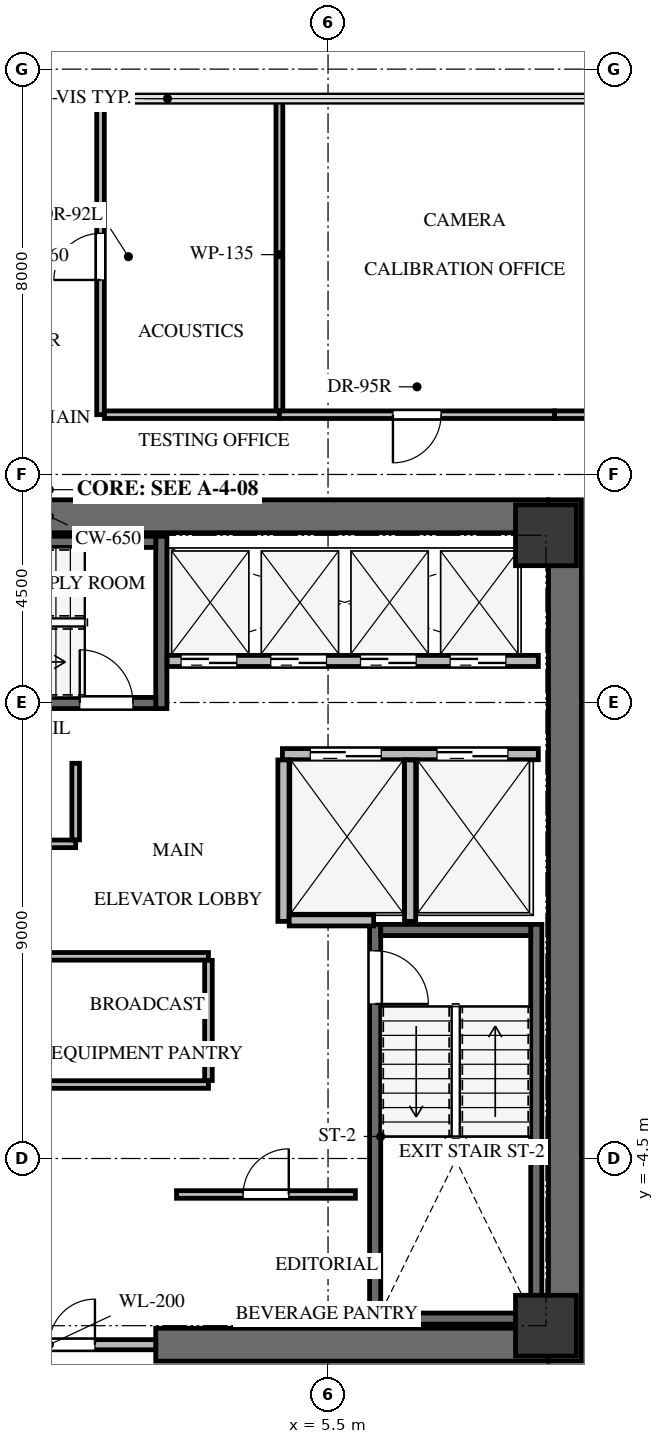
"""IFC4 building model, lengths in metres.
Left out: names, types, materials, properties, quantities, classifications, styles, units other than length and angle.
Written with IfcOpenShell. Run it as: python <this file> out.ifc"""

import sys

from ifc_helpers import new_model, si_unit, direction, frame, frame_2d, origin, origin_2d, place, context, subcontext, project, spatial, rectangle, extrude, source, transform, mapped, element, fill, save


model = new_model("IFC4")
c1 = context("Model", 3, precision=1e-05, world=origin(), true_north=direction((0.0, 1.0)))
c2 = subcontext(c1, "Body", "Model", "MODEL_VIEW")
j1 = project(units=[si_unit("LENGTHUNIT", "METRE"), si_unit("PLANEANGLEUNIT", "RADIAN")], contexts=[c1])
p1 = place(None, origin())
s1 = spatial("IfcSite", under=j1, at=p1, CompositionType="ELEMENT")
p2 = place(p1, origin())
s2 = spatial("IfcBuilding", under=s1, at=p2, CompositionType="ELEMENT")
p3 = place(p2, frame((0.0, 0.0, 159.3)))
s3 = spatial("IfcBuildingStorey", under=s2, at=p3, CompositionType="ELEMENT", Elevation=159.3)
p4 = place(p3, frame((10.175, -8.5, 0.0), z_axis=(0.0, 0.0, 1.0), x_axis=(0.0, 1.0, 0.0)))
e1 = element("IfcWall", 1, at=p4, inside=s3, PredefinedType="SHEAR", context=c2, shape_type="SweptSolid", body=[
    extrude(rectangle(XDim=17.0, YDim=0.65, at=frame_2d((8.5, 0.0))), origin(), (0.0, 0.0, 1.0), 3.3),
])
p5 = place(p3, frame((2.1, -8.175, 0.0), z_axis=(0.0, 0.0, 1.0), x_axis=(1.0, 0.0, 0.0)))
e2 = element("IfcWall", 2, at=p5, inside=s3, PredefinedType="SHEAR", context=c2, shape_type="SweptSolid", body=[
    extrude(rectangle(XDim=7.75, YDim=0.65, at=frame_2d((3.875, 0.0))), origin(), (0.0, 0.0, 1.0), 3.3),
])
p6 = place(p3, frame((-9.85, 8.175, 0.0), z_axis=(0.0, 0.0, 1.0), x_axis=(1.0, 0.0, 0.0)))
e3 = element("IfcWall", 3, at=p6, inside=s3, PredefinedType="SHEAR", context=c2, shape_type="SweptSolid", body=[
    extrude(rectangle(XDim=19.7, YDim=0.65, at=frame_2d((9.85, 0.0))), origin(), (0.0, 0.0, 1.0), 3.3),
])
p7 = place(p3, frame((9.61, -7.77, -0.24), z_axis=(0.0, 0.0, 1.0), x_axis=(0.0, 1.0, 0.0)))
e4 = element("IfcWall", 4, at=p7, inside=s3, PredefinedType="SHEAR", context=c2, shape_type="SweptSolid", body=[
    extrude(rectangle(XDim=7.89, YDim=0.22, at=frame_2d((3.945, 0.0))), origin(), (0.0, 0.0, 1.0), 3.22),
])
p8 = place(p3, frame((6.43, 0.12, -0.24), z_axis=(0.0, 0.0, 1.0), x_axis=(0.0, -1.0, 0.0)))
e5 = element("IfcWall", 5, at=p8, inside=s3, PredefinedType="SHEAR", context=c2, shape_type="SweptSolid", body=[
    extrude(rectangle(XDim=7.89, YDim=0.22, at=frame_2d((3.945, 0.0))), origin(), (0.0, 0.0, 1.0), 3.22),
])
p9 = place(p8, frame((0.52, 0.0, 0.0)))
e6 = element("IfcOpeningElement", 6, at=p9, cuts=e5, PredefinedType="OPENING", context=c2, shape_type="SweptSolid", body=[
    extrude(rectangle(XDim=1.05, YDim=2.15, at=frame_2d((0.525, 1.075))), frame((0.0, 0.12, 0.0), z_axis=(0.0, -1.0, 0.0), x_axis=(1.0, 0.0, 0.0)), (0.0, 0.0, 1.0), 0.24),
])
for number, where, z_axis, x_axis in (
    (7, (6.54, -7.66, -0.24), (0.0, 0.0, 1.0), (1.0, 0.0, 0.0)),
    (8, (9.5, 0.01, -0.24), (0.0, 0.0, 1.0), (-1.0, 0.0, 0.0)),
):
    element("IfcWall", number, at=place(p3, frame(where, z_axis=z_axis, x_axis=x_axis)), inside=s3, PredefinedType="SHEAR", context=c2, shape_type="SweptSolid", body=[
        extrude(rectangle(XDim=2.96, YDim=0.22, at=frame_2d((1.48, 0.0))), origin(), (0.0, 0.0, 1.0), 3.22),
    ])
p10 = place(p3, frame((2.21, 4.38, -0.24), z_axis=(0.0, 0.0, 1.0), x_axis=(0.0, 1.0, 0.0)))
e9 = element("IfcWall", 9, at=p10, inside=s3, PredefinedType="SHEAR", context=c2, shape_type="SweptSolid", body=[
    extrude(rectangle(XDim=3.4, YDim=0.22, at=frame_2d((1.7, 0.0))), origin(), (0.0, 0.0, 1.0), 3.22),
])
p11 = place(p3, frame((-5.25, 4.49, -0.24), z_axis=(0.0, 0.0, 1.0), x_axis=(1.0, 0.0, 0.0)))
e10 = element("IfcWall", 10, at=p11, inside=s3, PredefinedType="SHEAR", context=c2, shape_type="SweptSolid", body=[
    extrude(rectangle(XDim=7.35, YDim=0.22, at=frame_2d((3.675, 0.0))), origin(), (0.0, 0.0, 1.0), 3.22),
])
p12 = place(p11, frame((5.85, 0.0, 0.0)))
e11 = element("IfcOpeningElement", 11, at=p12, cuts=e10, PredefinedType="OPENING", context=c2, shape_type="SweptSolid", body=[
    extrude(rectangle(XDim=1.05, YDim=2.15, at=frame_2d((0.525, 1.075))), frame((0.0, 0.12, 0.0), z_axis=(0.0, -1.0, 0.0), x_axis=(1.0, 0.0, 0.0)), (0.0, 0.0, 1.0), 0.24),
])
p13 = place(p3, frame((2.1, 7.67, -0.24), z_axis=(0.0, 0.0, 1.0), x_axis=(-1.0, 0.0, 0.0)))
e12 = element("IfcWall", 12, at=p13, inside=s3, PredefinedType="SHEAR", context=c2, shape_type="SweptSolid", body=[
    extrude(rectangle(XDim=7.35, YDim=0.22, at=frame_2d((3.675, 0.0))), origin(), (0.0, 0.0, 1.0), 3.22),
])
m1 = source(origin(), c2, "Body", "SweptSolid", [
    extrude(rectangle(XDim=1.2, YDim=1.2, at=origin_2d()), origin(), (0.0, 0.0, 1.0), 3.22),
])
for number, where, z_axis, x_axis in (
    (13, (9.8, -7.8, -0.24), (0.0, 0.0, 1.0), (1.0, 0.0, 0.0)),
    (14, (9.8, 7.8, -0.24), (0.0, 0.0, 1.0), (1.0, 0.0, 0.0)),
):
    element("IfcColumn", number, at=place(p3, frame(where, z_axis=z_axis, x_axis=x_axis)), inside=s3, PredefinedType="COLUMN", context=c2, shape_type="MappedRepresentation", body=[
        mapped(m1, transform((0.0, 0.0, 0.0), x_axis=(1.0, 0.0, 0.0), y_axis=(0.0, 1.0, 0.0), z_axis=(0.0, 0.0, 1.0), scale=1.0)),
    ])
p14 = place(p3, frame((-2.1, -8.175, 0.0), z_axis=(0.0, 0.0, 1.0), x_axis=(1.0, 0.0, 0.0)))
e15 = element("IfcWall", 15, at=p14, inside=s3, PredefinedType="SOLIDWALL", context=c2, shape_type="SweptSolid", body=[
    extrude(rectangle(XDim=4.2, YDim=0.2, at=frame_2d((2.1, 0.0))), origin(), (0.0, 0.0, 1.0), 2.965),
])
p15 = place(p14, frame((1.2, 0.0, 0.0)))
e16 = element("IfcOpeningElement", 16, at=p15, cuts=e15, PredefinedType="OPENING", context=c2, shape_type="SweptSolid", body=[
    extrude(rectangle(XDim=1.8, YDim=2.15, at=frame_2d((0.9, 1.075))), frame((0.0, 0.11, 0.0), z_axis=(0.0, -1.0, 0.0), x_axis=(1.0, 0.0, 0.0)), (0.0, 0.0, 1.0), 0.22),
])
p16 = place(p3, frame((4.6, 3.48, 0.0), z_axis=(0.0, 0.0, 1.0), x_axis=(1.0, 0.0, 0.0)))
e17 = element("IfcWall", 17, at=p16, inside=s3, PredefinedType="SOLIDWALL", context=c2, shape_type="SweptSolid", body=[
    extrude(rectangle(XDim=5.05, YDim=0.22, at=frame_2d((2.525, 0.0))), origin(), (0.0, 0.0, 1.0), 2.965),
])
p17 = place(p16, frame((0.55, 0.0, 0.0)))
e18 = element("IfcOpeningElement", 18, at=p17, cuts=e17, PredefinedType="OPENING", context=c2, shape_type="SweptSolid", body=[
    extrude(rectangle(XDim=1.4, YDim=2.15, at=frame_2d((0.7, 1.075))), frame((0.0, 0.12, 0.0), z_axis=(0.0, -1.0, 0.0), x_axis=(1.0, 0.0, 0.0)), (0.0, 0.0, 1.0), 0.24),
])
p18 = place(p16, frame((3.05, 0.0, 0.0)))
e19 = element("IfcOpeningElement", 19, at=p18, cuts=e17, PredefinedType="OPENING", context=c2, shape_type="SweptSolid", body=[
    extrude(rectangle(XDim=1.4, YDim=2.15, at=frame_2d((0.7, 1.075))), frame((0.0, 0.12, 0.0), z_axis=(0.0, -1.0, 0.0), x_axis=(1.0, 0.0, 0.0)), (0.0, 0.0, 1.0), 0.24),
])
for number, where, z_axis, x_axis in (
    (20, (4.62, 0.18, 0.0), (0.0, 0.0, 1.0), (0.0, 1.0, 0.0)),
    (21, (7.12, 0.18, 0.0), (0.0, 0.0, 1.0), (0.0, 1.0, 0.0)),
):
    element("IfcWall", number, at=place(p3, frame(where, z_axis=z_axis, x_axis=x_axis)), inside=s3, PredefinedType="SOLIDWALL", context=c2, shape_type="SweptSolid", body=[
        extrude(rectangle(XDim=3.186, YDim=0.22, at=frame_2d((1.593, 0.0))), origin(), (0.0, 0.0, 1.0), 2.965),
    ])
p19 = place(p3, frame((4.734, 0.2, 0.0), z_axis=(0.0, 0.0, 1.0), x_axis=(1.0, 0.0, 0.0)))
e22 = element("IfcWall", 22, at=p19, inside=s3, PredefinedType="SOLIDWALL", context=c2, shape_type="SweptSolid", body=[
    extrude(rectangle(XDim=1.666, YDim=0.22, at=frame_2d((0.833, 0.0))), origin(), (0.0, 0.0, 1.0), 2.965),
])
p20 = place(p3, frame((2.325, 5.32, 0.0), z_axis=(0.0, 0.0, 1.0), x_axis=(1.0, 0.0, 0.0)))
e23 = element("IfcWall", 23, at=p20, inside=s3, PredefinedType="SOLIDWALL", context=c2, shape_type="SweptSolid", body=[
    extrude(rectangle(XDim=7.325, YDim=0.22, at=frame_2d((3.663, 0.0))), origin(), (0.0, 0.0, 1.0), 2.965),
])
p21 = place(p20, frame((0.275, 0.0, 0.0)))
e24 = element("IfcOpeningElement", 24, at=p21, cuts=e23, PredefinedType="OPENING", context=c2, shape_type="SweptSolid", body=[
    extrude(rectangle(XDim=1.1, YDim=2.15, at=frame_2d((0.55, 1.075))), frame((0.0, 0.12, 0.0), z_axis=(0.0, -1.0, 0.0), x_axis=(1.0, 0.0, 0.0)), (0.0, 0.0, 1.0), 0.24),
])
p22 = place(p20, frame((2.045, 0.0, 0.0)))
e25 = element("IfcOpeningElement", 25, at=p22, cuts=e23, PredefinedType="OPENING", context=c2, shape_type="SweptSolid", body=[
    extrude(rectangle(XDim=1.1, YDim=2.15, at=frame_2d((0.55, 1.075))), frame((0.0, 0.12, 0.0), z_axis=(0.0, -1.0, 0.0), x_axis=(1.0, 0.0, 0.0)), (0.0, 0.0, 1.0), 0.24),
])
p23 = place(p20, frame((3.815, 0.0, 0.0)))
e26 = element("IfcOpeningElement", 26, at=p23, cuts=e23, PredefinedType="OPENING", context=c2, shape_type="SweptSolid", body=[
    extrude(rectangle(XDim=1.1, YDim=2.15, at=frame_2d((0.55, 1.075))), frame((0.0, 0.12, 0.0), z_axis=(0.0, -1.0, 0.0), x_axis=(1.0, 0.0, 0.0)), (0.0, 0.0, 1.0), 0.24),
])
p24 = place(p20, frame((5.585, 0.0, 0.0)))
e27 = element("IfcOpeningElement", 27, at=p24, cuts=e23, PredefinedType="OPENING", context=c2, shape_type="SweptSolid", body=[
    extrude(rectangle(XDim=1.1, YDim=2.15, at=frame_2d((0.55, 1.075))), frame((0.0, 0.12, 0.0), z_axis=(0.0, -1.0, 0.0), x_axis=(1.0, 0.0, 0.0)), (0.0, 0.0, 1.0), 0.24),
])
p25 = place(p3, frame((2.51, -5.21, 0.0), z_axis=(0.0, 0.0, 1.0), x_axis=(1.0, 0.0, 0.0)))
e28 = element("IfcWall", 28, at=p25, inside=s3, PredefinedType="PARTITIONING", context=c2, shape_type="SweptSolid", body=[
    extrude(rectangle(XDim=3.53, YDim=0.15, at=frame_2d((1.765, 0.0))), origin(), (0.0, 0.0, 1.0), 2.965),
])
p26 = place(p25, frame((1.315, 0.0, 0.0)))
e29 = element("IfcOpeningElement", 29, at=p26, cuts=e28, PredefinedType="OPENING", context=c2, shape_type="SweptSolid", body=[
    extrude(rectangle(XDim=0.9, YDim=2.05, at=frame_2d((0.45, 1.025))), frame((0.0, 0.085, 0.0), z_axis=(0.0, -1.0, 0.0), x_axis=(1.0, 0.0, 0.0)), (0.0, 0.0, 1.0), 0.17),
])
p27 = place(p3, frame((3.14, -3.04, 0.0), z_axis=(0.0, 0.0, 1.0), x_axis=(-1.0, 0.0, 0.0)))
e30 = element("IfcWall", 30, at=p27, inside=s3, PredefinedType="PARTITIONING", context=c2, shape_type="SweptSolid", body=[
    extrude(rectangle(XDim=7.48, YDim=0.15, at=frame_2d((3.74, 0.0))), origin(), (0.0, 0.0, 1.0), 2.965),
])
p28 = place(p27, frame((3.29, 0.0, 0.0)))
e31 = element("IfcOpeningElement", 31, at=p28, cuts=e30, PredefinedType="OPENING", context=c2, shape_type="SweptSolid", body=[
    extrude(rectangle(XDim=0.9, YDim=2.05, at=frame_2d((0.45, 1.025))), frame((0.0, 0.085, 0.0), z_axis=(0.0, -1.0, 0.0), x_axis=(1.0, 0.0, 0.0)), (0.0, 0.0, 1.0), 0.17),
])
p29 = place(p3, frame((-4.34, -0.51, 0.0), z_axis=(0.0, 0.0, 1.0), x_axis=(1.0, 0.0, 0.0)))
e32 = element("IfcWall", 32, at=p29, inside=s3, PredefinedType="PARTITIONING", context=c2, shape_type="SweptSolid", body=[
    extrude(rectangle(XDim=7.48, YDim=0.15, at=frame_2d((3.74, 0.0))), origin(), (0.0, 0.0, 1.0), 2.965),
])
p30 = place(p3, frame((3.14, -0.589, 0.0), z_axis=(0.0, 0.0, 1.0), x_axis=(0.0, -1.0, 0.0)))
e33 = element("IfcWall", 33, at=p30, inside=s3, PredefinedType="PARTITIONING", context=c2, shape_type="SweptSolid", body=[
    extrude(rectangle(XDim=2.372, YDim=0.15, at=frame_2d((1.186, 0.0))), origin(), (0.0, 0.0, 1.0), 2.965),
])
p31 = place(p3, frame((0.52, 1.71, 0.0), z_axis=(0.0, 0.0, 1.0), x_axis=(-1.0, 0.0, 0.0)))
e34 = element("IfcWall", 34, at=p31, inside=s3, PredefinedType="PARTITIONING", context=c2, shape_type="SweptSolid", body=[
    extrude(rectangle(XDim=2.94, YDim=0.15, at=frame_2d((1.47, 0.0))), origin(), (0.0, 0.0, 1.0), 2.965),
])
p32 = place(p31, frame((1.02, 0.0, 0.0)))
e35 = element("IfcOpeningElement", 35, at=p32, cuts=e34, PredefinedType="OPENING", context=c2, shape_type="SweptSolid", body=[
    extrude(rectangle(XDim=0.9, YDim=2.05, at=frame_2d((0.45, 1.025))), frame((0.0, 0.085, 0.0), z_axis=(0.0, -1.0, 0.0), x_axis=(1.0, 0.0, 0.0)), (0.0, 0.0, 1.0), 0.17),
])
p33 = place(p3, frame((0.52, 3.3, 0.0), z_axis=(0.0, 0.0, 1.0), x_axis=(0.0, -1.0, 0.0)))
e36 = element("IfcWall", 36, at=p33, inside=s3, PredefinedType="PARTITIONING", context=c2, shape_type="SweptSolid", body=[
    extrude(rectangle(XDim=1.511, YDim=0.15, at=frame_2d((0.755, 0.0))), origin(), (0.0, 0.0, 1.0), 2.965),
])
p34 = place(p3, frame((1.01, 10.18, 0.0), z_axis=(0.0, 0.0, 1.0), x_axis=(0.0, 1.0, 0.0)))
e37 = element("IfcWall", 37, at=p34, inside=s3, PredefinedType="PARTITIONING", context=c2, shape_type="SweptSolid", body=[
    extrude(rectangle(XDim=6.238, YDim=0.15, at=frame_2d((3.119, 0.0))), origin(), (0.0, 0.0, 1.0), 2.319),
])
p35 = place(p34, frame((2.659, 0.0, 0.0)))
e38 = element("IfcOpeningElement", 38, at=p35, cuts=e37, PredefinedType="OPENING", context=c2, shape_type="SweptSolid", body=[
    extrude(rectangle(XDim=0.92, YDim=2.1, at=frame_2d((0.46, 1.05))), frame((0.0, 0.085, 0.0), z_axis=(0.0, -1.0, 0.0), x_axis=(1.0, 0.0, 0.0)), (0.0, 0.0, 1.0), 0.17),
])
p36 = place(p3, frame((4.54, 10.18, 0.0), z_axis=(0.0, 0.0, 1.0), x_axis=(-1.0, 0.0, 0.0)))
e39 = element("IfcWall", 39, at=p36, inside=s3, PredefinedType="PARTITIONING", context=c2, shape_type="SweptSolid", body=[
    extrude(rectangle(XDim=3.451, YDim=0.15, at=frame_2d((1.726, 0.0))), origin(), (0.0, 0.0, 1.0), 2.528),
])
p37 = place(p3, frame((9.971, 10.18, 0.0), z_axis=(0.0, 0.0, 1.0), x_axis=(-1.0, 0.0, 0.0)))
e40 = element("IfcWall", 40, at=p37, inside=s3, PredefinedType="PARTITIONING", context=c2, shape_type="SweptSolid", body=[
    extrude(rectangle(XDim=5.431, YDim=0.15, at=frame_2d((2.716, 0.0))), origin(), (0.0, 0.0, 1.0), 2.528),
])
p38 = place(p37, frame((2.241, 0.0, 0.0)))
e41 = element("IfcOpeningElement", 41, at=p38, cuts=e40, PredefinedType="OPENING", context=c2, shape_type="SweptSolid", body=[
    extrude(rectangle(XDim=0.95, YDim=2.1, at=frame_2d((0.475, 1.05))), frame((0.0, 0.085, 0.0), z_axis=(0.0, -1.0, 0.0), x_axis=(1.0, 0.0, 0.0)), (0.0, 0.0, 1.0), 0.17),
])
p39 = place(p3, frame((11.146, 10.18, 0.0), z_axis=(0.0, 0.0, 1.0), x_axis=(-1.0, 0.0, 0.0)))
e42 = element("IfcWall", 42, at=p39, inside=s3, PredefinedType="PARTITIONING", context=c2, shape_type="SweptSolid", body=[
    extrude(rectangle(XDim=1.174, YDim=0.15, at=frame_2d((0.587, 0.0))), origin(), (0.0, 0.0, 1.0), 2.162),
])
p40 = place(p3, frame((4.54, 16.418, 0.0), z_axis=(0.0, 0.0, 1.0), x_axis=(0.0, -1.0, 0.0)))
e43 = element("IfcWall", 43, at=p40, inside=s3, PredefinedType="PARTITIONING", context=c2, shape_type="SweptSolid", body=[
    extrude(rectangle(XDim=6.159, YDim=0.135, at=frame_2d((3.08, 0.0))), origin(), (0.0, 0.0, 1.0), 2.319),
])
m2 = source(origin(), c2, "Body", "SweptSolid", [
    extrude(rectangle(XDim=1.05, YDim=2.15, at=frame_2d((0.525, 1.075))), frame((0.0, 0.025, 0.0), z_axis=(0.0, -1.0, 0.0), x_axis=(1.0, 0.0, 0.0)), (0.0, 0.0, 1.0), 0.05),
])
p41 = place(p9, origin())
e44 = element("IfcDoor", 44, at=p41, inside=s3, OperationType="SINGLE_SWING_RIGHT", PredefinedType="DOOR", context=c2, shape_type="MappedRepresentation", body=[
    mapped(m2, transform((0.0, 0.0, 0.0), x_axis=(1.0, 0.0, 0.0), y_axis=(0.0, 1.0, 0.0), z_axis=(0.0, 0.0, 1.0), scale=1.0)),
])
fill(e6, e44)
m3 = source(origin(), c2, "Body", "SweptSolid", [
    extrude(rectangle(XDim=1.05, YDim=2.15, at=frame_2d((0.525, 1.075))), frame((0.0, 0.025, 0.0), z_axis=(0.0, -1.0, 0.0), x_axis=(1.0, 0.0, 0.0)), (0.0, 0.0, 1.0), 0.05),
])
p42 = place(p12, origin())
e45 = element("IfcDoor", 45, at=p42, inside=s3, OperationType="SINGLE_SWING_LEFT", PredefinedType="DOOR", context=c2, shape_type="MappedRepresentation", body=[
    mapped(m3, transform((0.0, 0.0, 0.0), x_axis=(1.0, 0.0, 0.0), y_axis=(0.0, 1.0, 0.0), z_axis=(0.0, 0.0, 1.0), scale=1.0)),
])
fill(e11, e45)
m4 = source(origin(), c2, "Body", "SweptSolid", [
    extrude(rectangle(XDim=1.8, YDim=2.15, at=frame_2d((0.9, 1.075))), frame((0.0, 0.025, 0.0), z_axis=(0.0, -1.0, 0.0), x_axis=(1.0, 0.0, 0.0)), (0.0, 0.0, 1.0), 0.05),
])
p43 = place(p15, origin())
e46 = element("IfcDoor", 46, at=p43, inside=s3, OperationType="DOUBLE_DOOR_SINGLE_SWING", PredefinedType="DOOR", context=c2, shape_type="MappedRepresentation", body=[
    mapped(m4, transform((0.0, 0.0, 0.0), x_axis=(1.0, 0.0, 0.0), y_axis=(0.0, 1.0, 0.0), z_axis=(0.0, 0.0, 1.0), scale=1.0)),
])
fill(e16, e46)
m5 = source(origin(), c2, "Body", "SweptSolid", [
    extrude(rectangle(XDim=1.4, YDim=2.15, at=frame_2d((0.7, 1.075))), frame((0.0, 0.025, 0.0), z_axis=(0.0, -1.0, 0.0), x_axis=(1.0, 0.0, 0.0)), (0.0, 0.0, 1.0), 0.05),
])
p44 = place(p17, origin())
e47 = element("IfcDoor", 47, at=p44, inside=s3, OperationType="DOUBLE_DOOR_SLIDING", PredefinedType="DOOR", context=c2, shape_type="MappedRepresentation", body=[
    mapped(m5, transform((0.0, 0.0, 0.0), x_axis=(1.0, 0.0, 0.0), y_axis=(0.0, 1.0, 0.0), z_axis=(0.0, 0.0, 1.0), scale=1.0)),
])
fill(e18, e47)
p45 = place(p18, origin())
e48 = element("IfcDoor", 48, at=p45, inside=s3, OperationType="DOUBLE_DOOR_SLIDING", PredefinedType="DOOR", context=c2, shape_type="MappedRepresentation", body=[
    mapped(m5, transform((0.0, 0.0, 0.0), x_axis=(1.0, 0.0, 0.0), y_axis=(0.0, 1.0, 0.0), z_axis=(0.0, 0.0, 1.0), scale=1.0)),
])
fill(e19, e48)
m6 = source(origin(), c2, "Body", "SweptSolid", [
    extrude(rectangle(XDim=1.1, YDim=2.15, at=frame_2d((0.55, 1.075))), frame((0.0, 0.025, 0.0), z_axis=(0.0, -1.0, 0.0), x_axis=(1.0, 0.0, 0.0)), (0.0, 0.0, 1.0), 0.05),
])
p46 = place(p21, origin())
e49 = element("IfcDoor", 49, at=p46, inside=s3, OperationType="DOUBLE_DOOR_SLIDING", PredefinedType="DOOR", context=c2, shape_type="MappedRepresentation", body=[
    mapped(m6, transform((0.0, 0.0, 0.0), x_axis=(1.0, 0.0, 0.0), y_axis=(0.0, 1.0, 0.0), z_axis=(0.0, 0.0, 1.0), scale=1.0)),
])
fill(e24, e49)
p47 = place(p22, origin())
e50 = element("IfcDoor", 50, at=p47, inside=s3, OperationType="DOUBLE_DOOR_SLIDING", PredefinedType="DOOR", context=c2, shape_type="MappedRepresentation", body=[
    mapped(m6, transform((0.0, 0.0, 0.0), x_axis=(1.0, 0.0, 0.0), y_axis=(0.0, 1.0, 0.0), z_axis=(0.0, 0.0, 1.0), scale=1.0)),
])
fill(e25, e50)
p48 = place(p23, origin())
e51 = element("IfcDoor", 51, at=p48, inside=s3, OperationType="DOUBLE_DOOR_SLIDING", PredefinedType="DOOR", context=c2, shape_type="MappedRepresentation", body=[
    mapped(m6, transform((0.0, 0.0, 0.0), x_axis=(1.0, 0.0, 0.0), y_axis=(0.0, 1.0, 0.0), z_axis=(0.0, 0.0, 1.0), scale=1.0)),
])
fill(e26, e51)
p49 = place(p24, origin())
e52 = element("IfcDoor", 52, at=p49, inside=s3, OperationType="DOUBLE_DOOR_SLIDING", PredefinedType="DOOR", context=c2, shape_type="MappedRepresentation", body=[
    mapped(m6, transform((0.0, 0.0, 0.0), x_axis=(1.0, 0.0, 0.0), y_axis=(0.0, 1.0, 0.0), z_axis=(0.0, 0.0, 1.0), scale=1.0)),
])
fill(e27, e52)
m7 = source(origin(), c2, "Body", "SweptSolid", [
    extrude(rectangle(XDim=0.9, YDim=2.05, at=frame_2d((0.45, 1.025))), frame((0.0, 0.025, 0.0), z_axis=(0.0, -1.0, 0.0), x_axis=(1.0, 0.0, 0.0)), (0.0, 0.0, 1.0), 0.05),
])
p50 = place(p26, origin())
e53 = element("IfcDoor", 53, at=p50, inside=s3, OperationType="SINGLE_SWING_RIGHT", PredefinedType="DOOR", context=c2, shape_type="MappedRepresentation", body=[
    mapped(m7, transform((0.0, 0.0, 0.0), x_axis=(1.0, 0.0, 0.0), y_axis=(0.0, 1.0, 0.0), z_axis=(0.0, 0.0, 1.0), scale=1.0)),
])
fill(e29, e53)
m8 = source(origin(), c2, "Body", "SweptSolid", [
    extrude(rectangle(XDim=0.92, YDim=2.1, at=frame_2d((0.46, 1.05))), frame((0.0, 0.025, 0.0), z_axis=(0.0, -1.0, 0.0), x_axis=(1.0, 0.0, 0.0)), (0.0, 0.0, 1.0), 0.05),
])
p51 = place(p35, origin())
e54 = element("IfcDoor", 54, at=p51, inside=s3, OperationType="SINGLE_SWING_LEFT", PredefinedType="DOOR", context=c2, shape_type="MappedRepresentation", body=[
    mapped(m8, transform((0.0, 0.0, 0.0), x_axis=(1.0, 0.0, 0.0), y_axis=(0.0, 1.0, 0.0), z_axis=(0.0, 0.0, 1.0), scale=1.0)),
])
fill(e38, e54)
m9 = source(origin(), c2, "Body", "SweptSolid", [
    extrude(rectangle(XDim=0.95, YDim=2.1, at=frame_2d((0.475, 1.05))), frame((0.0, 0.025, 0.0), z_axis=(0.0, -1.0, 0.0), x_axis=(1.0, 0.0, 0.0)), (0.0, 0.0, 1.0), 0.05),
])
p52 = place(p38, origin())
e55 = element("IfcDoor", 55, at=p52, inside=s3, OperationType="SINGLE_SWING_RIGHT", PredefinedType="DOOR", context=c2, shape_type="MappedRepresentation", body=[
    mapped(m9, transform((0.0, 0.0, 0.0), x_axis=(1.0, 0.0, 0.0), y_axis=(0.0, 1.0, 0.0), z_axis=(0.0, 0.0, 1.0), scale=1.0)),
])
fill(e41, e55)
save(model, sys.argv[1])
